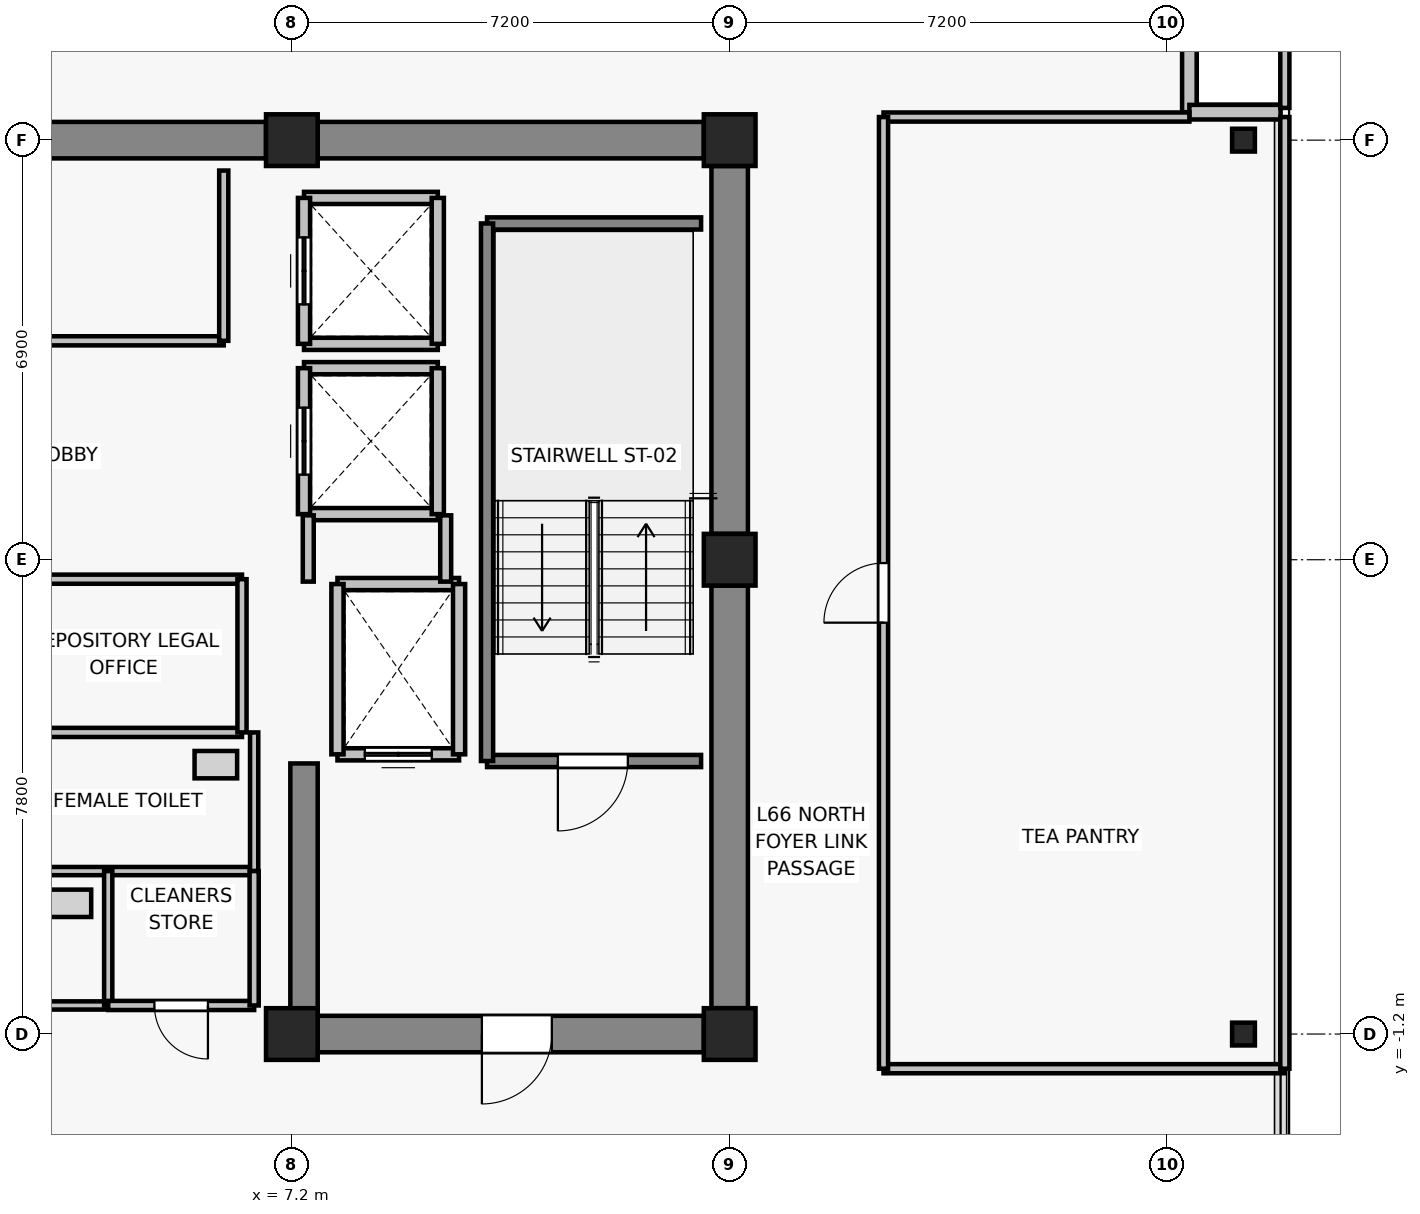
"""IFC4 building model, lengths in metres.
Left out: names, types, materials, properties, quantities, classifications, styles, units other than length and angle.
Written with IfcOpenShell. Run it as: python <this file> out.ifc"""

import sys

from ifc_helpers import new_model, si_unit, direction, frame, frame_2d, origin, origin_2d, place, context, subcontext, project, spatial, rectangle, i_section, extrude, source, transform, mapped, element, fill, save


model = new_model("IFC4")
c1 = context("Model", 3, precision=1e-05, world=origin(), true_north=direction((0.0, 1.0)))
c2 = subcontext(c1, "Body", "Model", "MODEL_VIEW")
j1 = project(units=[si_unit("LENGTHUNIT", "METRE"), si_unit("PLANEANGLEUNIT", "RADIAN")], contexts=[c1])
p1 = place(None, origin())
s1 = spatial("IfcSite", under=j1, at=p1, CompositionType="ELEMENT")
p2 = place(p1, origin())
s2 = spatial("IfcBuilding", under=s1, at=p2, CompositionType="ELEMENT")
p3 = place(p2, frame((0.0, 0.0, 235.3)))
s3 = spatial("IfcBuildingStorey", under=s2, at=p3, CompositionType="ELEMENT", Elevation=235.3)
for number, where, z_axis, x_axis in (
    (1, (7.2, -1.2, 0.0), (0.0, 0.0, 1.0), (1.0, 0.0, 0.0)),
    (2, (14.4, -1.2, 0.0), (0.0, 0.0, 1.0), (1.0, 0.0, 0.0)),
    (3, (14.4, 6.6, 0.0), (0.0, 0.0, 1.0), (1.0, 0.0, 0.0)),
    (4, (7.2, 13.5, 0.0), (0.0, 0.0, 1.0), (1.0, 0.0, 0.0)),
    (5, (14.4, 13.5, 0.0), (0.0, 0.0, 1.0), (1.0, 0.0, 0.0)),
):
    element("IfcColumn", number, at=place(p3, frame(where, z_axis=z_axis, x_axis=x_axis)), inside=s3, PredefinedType="COLUMN", context=c2, shape_type="SweptSolid", body=[
        extrude(rectangle(XDim=0.85, YDim=0.85, at=origin_2d()), origin(), (0.0, 0.0, 1.0), 3.3),
    ])
for number, where, z_axis, x_axis in (
    (6, (22.85, -1.2, 0.0), (0.0, 0.0, 1.0), (1.0, 0.0, 0.0)),
    (7, (22.85, 13.5, 0.0), (0.0, 0.0, 1.0), (1.0, 0.0, 0.0)),
):
    element("IfcColumn", number, at=place(p3, frame(where, z_axis=z_axis, x_axis=x_axis)), inside=s3, PredefinedType="COLUMN", context=c2, shape_type="SweptSolid", body=[
        extrude(i_section(OverallWidth=0.375, OverallDepth=0.375, WebThickness=0.017, FlangeThickness=0.027, FilletRadius=0.015, at=origin_2d()), origin(), (0.0, 0.0, 1.0), 3.3),
    ])
p4 = place(p3, frame((-6.775, 13.5, 0.0), z_axis=(0.0, 0.0, 1.0), x_axis=(1.0, 0.0, 0.0)))
e8 = element("IfcWall", 8, at=p4, inside=s3, PredefinedType="SHEAR", context=c2, shape_type="SweptSolid", body=[
    extrude(rectangle(XDim=13.55, YDim=0.6, at=frame_2d((6.775, 0.0))), origin(), (0.0, 0.0, 1.0), 3.075),
])
p5 = place(p3, frame((7.625, 13.5, 0.0), z_axis=(0.0, 0.0, 1.0), x_axis=(1.0, 0.0, 0.0)))
e9 = element("IfcWall", 9, at=p5, inside=s3, PredefinedType="SHEAR", context=c2, shape_type="SweptSolid", body=[
    extrude(rectangle(XDim=6.35, YDim=0.6, at=frame_2d((3.175, 0.0))), origin(), (0.0, 0.0, 1.0), 3.075),
])
p6 = place(p3, frame((14.4, -0.775, 0.0), z_axis=(0.0, 0.0, 1.0), x_axis=(0.0, 1.0, 0.0)))
e10 = element("IfcWall", 10, at=p6, inside=s3, PredefinedType="SHEAR", context=c2, shape_type="SweptSolid", body=[
    extrude(rectangle(XDim=6.95, YDim=0.6, at=frame_2d((3.475, 0.0))), origin(), (0.0, 0.0, 1.0), 3.075),
])
p7 = place(p3, frame((14.4, 7.025, 0.0), z_axis=(0.0, 0.0, 1.0), x_axis=(0.0, 1.0, 0.0)))
e11 = element("IfcWall", 11, at=p7, inside=s3, PredefinedType="SHEAR", context=c2, shape_type="SweptSolid", body=[
    extrude(rectangle(XDim=6.05, YDim=0.6, at=frame_2d((3.025, 0.0))), origin(), (0.0, 0.0, 1.0), 3.075),
])
p8 = place(p3, frame((13.975, -1.2, 0.0), z_axis=(0.0, 0.0, 1.0), x_axis=(-1.0, 0.0, 0.0)))
e12 = element("IfcWall", 12, at=p8, inside=s3, PredefinedType="SHEAR", context=c2, shape_type="SweptSolid", body=[
    extrude(rectangle(XDim=6.35, YDim=0.6, at=frame_2d((3.175, 0.0))), origin(), (0.0, 0.0, 1.0), 3.075),
])
p9 = place(p8, frame((2.5, 0.0, 0.0)))
e13 = element("IfcOpeningElement", 13, at=p9, cuts=e12, PredefinedType="OPENING", context=c2, shape_type="SweptSolid", body=[
    extrude(rectangle(XDim=1.15, YDim=2.15, at=frame_2d((0.575, 1.075))), frame((0.0, 0.31, 0.0), z_axis=(0.0, -1.0, 0.0), x_axis=(1.0, 0.0, 0.0)), (0.0, 0.0, 1.0), 0.62),
])
p10 = place(p3, frame((7.4, -0.9, 0.0), z_axis=(0.0, 0.0, 1.0), x_axis=(0.0, 1.0, 0.0)))
e14 = element("IfcWall", 14, at=p10, inside=s3, PredefinedType="SHEAR", context=c2, shape_type="SweptSolid", body=[
    extrude(rectangle(XDim=4.15, YDim=0.45, at=frame_2d((2.075, 0.0))), origin(), (0.0, 0.0, 1.0), 3.075),
])
for number, where, z_axis, x_axis in (
    (15, (21.96, 13.96, 0.0), (0.0, 0.0, 1.0), (0.0, 1.0, 0.0)),
    (16, (23.46, 13.96, 0.0), (0.0, 0.0, 1.0), (-1.0, 0.0, 0.0)),
):
    element("IfcWall", number, at=place(p3, frame(where, z_axis=z_axis, x_axis=x_axis)), inside=s3, PredefinedType="SOLIDWALL", context=c2, shape_type="SweptSolid", body=[
        extrude(rectangle(XDim=1.5, YDim=0.24, at=frame_2d((0.75, 0.0))), origin(), (0.0, 0.0, 1.0), 3.075),
    ])
p11 = place(p3, frame((9.95, 3.4, 0.0), z_axis=(0.0, 0.0, 1.0), x_axis=(-1.0, 0.0, 0.0)))
e17 = element("IfcWall", 17, at=p11, inside=s3, PredefinedType="SOLIDWALL", context=c2, shape_type="SweptSolid", body=[
    extrude(rectangle(XDim=2.0, YDim=0.2, at=frame_2d((1.0, 0.0))), origin(), (0.0, 0.0, 1.0), 3.075),
])
p12 = place(p11, frame((0.45, 0.0, 0.0)))
e18 = element("IfcOpeningElement", 18, at=p12, cuts=e17, PredefinedType="OPENING", context=c2, shape_type="SweptSolid", body=[
    extrude(rectangle(XDim=1.1, YDim=2.2, at=frame_2d((0.55, 1.1))), frame((0.0, 0.11, 0.0), z_axis=(0.0, -1.0, 0.0), x_axis=(1.0, 0.0, 0.0)), (0.0, 0.0, 1.0), 0.22),
])
p13 = place(p3, frame((7.95, 6.2, 0.0), z_axis=(0.0, 0.0, 1.0), x_axis=(1.0, 0.0, 0.0)))
e19 = element("IfcWall", 19, at=p13, inside=s3, PredefinedType="SOLIDWALL", context=c2, shape_type="SweptSolid", body=[
    extrude(rectangle(XDim=2.0, YDim=0.2, at=frame_2d((1.0, 0.0))), origin(), (0.0, 0.0, 1.0), 3.075),
])
for number, where, z_axis, x_axis in (
    (20, (7.95, 3.4, 0.0), (0.0, 0.0, 1.0), (0.0, 1.0, 0.0)),
    (21, (9.95, 6.2, 0.0), (0.0, 0.0, 1.0), (0.0, -1.0, 0.0)),
):
    element("IfcWall", number, at=place(p3, frame(where, z_axis=z_axis, x_axis=x_axis)), inside=s3, PredefinedType="SOLIDWALL", context=c2, shape_type="SweptSolid", body=[
        extrude(rectangle(XDim=2.8, YDim=0.2, at=frame_2d((1.4, 0.0))), origin(), (0.0, 0.0, 1.0), 3.075),
    ])
for number, where, z_axis, x_axis in (
    (22, (9.6, 7.35, 0.0), (0.0, 0.0, 1.0), (-1.0, 0.0, 0.0)),
    (23, (7.4, 9.75, 0.0), (0.0, 0.0, 1.0), (1.0, 0.0, 0.0)),
):
    element("IfcWall", number, at=place(p3, frame(where, z_axis=z_axis, x_axis=x_axis)), inside=s3, PredefinedType="SOLIDWALL", context=c2, shape_type="SweptSolid", body=[
        extrude(rectangle(XDim=2.2, YDim=0.2, at=frame_2d((1.1, 0.0))), origin(), (0.0, 0.0, 1.0), 2.615),
    ])
p14 = place(p3, frame((7.4, 7.35, 0.0), z_axis=(0.0, 0.0, 1.0), x_axis=(0.0, 1.0, 0.0)))
e24 = element("IfcWall", 24, at=p14, inside=s3, PredefinedType="SOLIDWALL", context=c2, shape_type="SweptSolid", body=[
    extrude(rectangle(XDim=2.4, YDim=0.2, at=frame_2d((1.2, 0.0))), origin(), (0.0, 0.0, 1.0), 2.615),
])
p15 = place(p14, frame((0.65, 0.0, 0.0)))
e25 = element("IfcOpeningElement", 25, at=p15, cuts=e24, PredefinedType="OPENING", context=c2, shape_type="SweptSolid", body=[
    extrude(rectangle(XDim=1.1, YDim=2.2, at=frame_2d((0.55, 1.1))), frame((0.0, 0.11, 0.0), z_axis=(0.0, -1.0, 0.0), x_axis=(1.0, 0.0, 0.0)), (0.0, 0.0, 1.0), 0.22),
])
p16 = place(p3, frame((9.6, 9.75, 0.0), z_axis=(0.0, 0.0, 1.0), x_axis=(0.0, -1.0, 0.0)))
e26 = element("IfcWall", 26, at=p16, inside=s3, PredefinedType="SOLIDWALL", context=c2, shape_type="SweptSolid", body=[
    extrude(rectangle(XDim=2.4, YDim=0.2, at=frame_2d((1.2, 0.0))), origin(), (0.0, 0.0, 1.0), 3.075),
])
for number, where, z_axis, x_axis in (
    (27, (9.6, 10.15, 0.0), (0.0, 0.0, 1.0), (-1.0, 0.0, 0.0)),
    (28, (7.4, 12.55, 0.0), (0.0, 0.0, 1.0), (1.0, 0.0, 0.0)),
):
    element("IfcWall", number, at=place(p3, frame(where, z_axis=z_axis, x_axis=x_axis)), inside=s3, PredefinedType="SOLIDWALL", context=c2, shape_type="SweptSolid", body=[
        extrude(rectangle(XDim=2.2, YDim=0.2, at=frame_2d((1.1, 0.0))), origin(), (0.0, 0.0, 1.0), 2.615),
    ])
p17 = place(p3, frame((7.4, 10.15, 0.0), z_axis=(0.0, 0.0, 1.0), x_axis=(0.0, 1.0, 0.0)))
e29 = element("IfcWall", 29, at=p17, inside=s3, PredefinedType="SOLIDWALL", context=c2, shape_type="SweptSolid", body=[
    extrude(rectangle(XDim=2.4, YDim=0.2, at=frame_2d((1.2, 0.0))), origin(), (0.0, 0.0, 1.0), 2.615),
])
p18 = place(p17, frame((0.65, 0.0, 0.0)))
e30 = element("IfcOpeningElement", 30, at=p18, cuts=e29, PredefinedType="OPENING", context=c2, shape_type="SweptSolid", body=[
    extrude(rectangle(XDim=1.1, YDim=2.2, at=frame_2d((0.55, 1.1))), frame((0.0, 0.11, 0.0), z_axis=(0.0, -1.0, 0.0), x_axis=(1.0, 0.0, 0.0)), (0.0, 0.0, 1.0), 0.22),
])
p19 = place(p3, frame((9.6, 12.55, 0.0), z_axis=(0.0, 0.0, 1.0), x_axis=(0.0, -1.0, 0.0)))
e31 = element("IfcWall", 31, at=p19, inside=s3, PredefinedType="SOLIDWALL", context=c2, shape_type="SweptSolid", body=[
    extrude(rectangle(XDim=2.4, YDim=0.2, at=frame_2d((1.2, 0.0))), origin(), (0.0, 0.0, 1.0), 3.075),
])
p20 = place(p3, frame((13.93, 3.29, 0.0), z_axis=(0.0, 0.0, 1.0), x_axis=(-1.0, 0.0, 0.0)))
e32 = element("IfcWall", 32, at=p20, inside=s3, PredefinedType="SOLIDWALL", context=c2, shape_type="SweptSolid", body=[
    extrude(rectangle(XDim=3.52, YDim=0.2, at=frame_2d((1.76, 0.0))), origin(), (0.0, 0.0, 1.0), 3.075),
])
p21 = place(p20, frame((1.205, 0.0, 0.0)))
e33 = element("IfcOpeningElement", 33, at=p21, cuts=e32, PredefinedType="OPENING", context=c2, shape_type="SweptSolid", body=[
    extrude(rectangle(XDim=1.15, YDim=2.15, at=frame_2d((0.575, 1.075))), frame((0.0, 0.11, 0.0), z_axis=(0.0, -1.0, 0.0), x_axis=(1.0, 0.0, 0.0)), (0.0, 0.0, 1.0), 0.22),
])
p22 = place(p3, frame((10.41, 12.13, 0.0), z_axis=(0.0, 0.0, 1.0), x_axis=(1.0, 0.0, 0.0)))
e34 = element("IfcWall", 34, at=p22, inside=s3, PredefinedType="SOLIDWALL", context=c2, shape_type="SweptSolid", body=[
    extrude(rectangle(XDim=3.52, YDim=0.2, at=frame_2d((1.76, 0.0))), origin(), (0.0, 0.0, 1.0), 3.075),
])
p23 = place(p3, frame((10.41, 3.29, 0.0), z_axis=(0.0, 0.0, 1.0), x_axis=(0.0, 1.0, 0.0)))
e35 = element("IfcWall", 35, at=p23, inside=s3, PredefinedType="SOLIDWALL", context=c2, shape_type="SweptSolid", body=[
    extrude(rectangle(XDim=8.84, YDim=0.2, at=frame_2d((4.42, 0.0))), origin(), (0.0, 0.0, 1.0), 3.075),
])
p24 = place(p3, frame((7.47, 6.24, 0.0), z_axis=(0.0, 0.0, 1.0), x_axis=(0.0, 1.0, 0.0)))
e36 = element("IfcWall", 36, at=p24, inside=s3, PredefinedType="PARTITIONING", context=c2, shape_type="SweptSolid", body=[
    extrude(rectangle(XDim=1.09, YDim=0.18, at=frame_2d((0.545, 0.0))), origin(), (0.0, 0.0, 1.0), 2.615),
])
p25 = place(p3, frame((9.73, 7.33, 0.0), z_axis=(0.0, 0.0, 1.0), x_axis=(0.0, -1.0, 0.0)))
e37 = element("IfcWall", 37, at=p25, inside=s3, PredefinedType="PARTITIONING", context=c2, shape_type="SweptSolid", body=[
    extrude(rectangle(XDim=1.09, YDim=0.18, at=frame_2d((0.545, 0.0))), origin(), (0.0, 0.0, 1.0), 3.075),
])
p26 = place(p3, frame((6.08, 10.2, 0.0), z_axis=(0.0, 0.0, 1.0), x_axis=(-1.0, 0.0, 0.0)))
e38 = element("IfcWall", 38, at=p26, inside=s3, PredefinedType="PARTITIONING", context=c2, shape_type="SweptSolid", body=[
    extrude(rectangle(XDim=12.16, YDim=0.15, at=frame_2d((6.08, 0.0))), origin(), (0.0, 0.0, 1.0), 3.075),
])
p27 = place(p26, frame((7.005, 0.0, 0.0)))
e39 = element("IfcOpeningElement", 39, at=p27, cuts=e38, PredefinedType="OPENING", context=c2, shape_type="SweptSolid", body=[
    extrude(rectangle(XDim=1.15, YDim=2.15, at=frame_2d((0.575, 1.075))), frame((0.0, 0.085, 0.0), z_axis=(0.0, -1.0, 0.0), x_axis=(1.0, 0.0, 0.0)), (0.0, 0.0, 1.0), 0.17),
])
p28 = place(p3, frame((6.08, 13.0, 0.0), z_axis=(0.0, 0.0, 1.0), x_axis=(0.0, -1.0, 0.0)))
e40 = element("IfcWall", 40, at=p28, inside=s3, PredefinedType="PARTITIONING", context=c2, shape_type="SweptSolid", body=[
    extrude(rectangle(XDim=2.8, YDim=0.15, at=frame_2d((1.4, 0.0))), origin(), (0.0, 0.0, 1.0), 3.075),
])
for number, where, z_axis, x_axis in (
    (41, (6.38, 3.76, 0.0), (0.0, 0.0, 1.0), (-1.0, 0.0, 0.0)),
    (42, (1.47, 6.28, 0.0), (0.0, 0.0, 1.0), (1.0, 0.0, 0.0)),
):
    element("IfcWall", number, at=place(p3, frame(where, z_axis=z_axis, x_axis=x_axis)), inside=s3, PredefinedType="PARTITIONING", context=c2, shape_type="SweptSolid", body=[
        extrude(rectangle(XDim=4.91, YDim=0.15, at=frame_2d((2.455, 0.0))), origin(), (0.0, 0.0, 1.0), 3.075),
    ])
p29 = place(p3, frame((6.38, 6.28, 0.0), z_axis=(0.0, 0.0, 1.0), x_axis=(0.0, -1.0, 0.0)))
e43 = element("IfcWall", 43, at=p29, inside=s3, PredefinedType="PARTITIONING", context=c2, shape_type="SweptSolid", body=[
    extrude(rectangle(XDim=2.52, YDim=0.15, at=frame_2d((1.26, 0.0))), origin(), (0.0, 0.0, 1.0), 3.075),
])
p30 = place(p3, frame((6.58, 1.48, 0.0), z_axis=(0.0, 0.0, 1.0), x_axis=(-1.0, 0.0, 0.0)))
e44 = element("IfcWall", 44, at=p30, inside=s3, PredefinedType="PARTITIONING", context=c2, shape_type="SweptSolid", body=[
    extrude(rectangle(XDim=5.11, YDim=0.135, at=frame_2d((2.555, 0.0))), origin(), (0.0, 0.0, 1.0), 3.075),
])
p31 = place(p3, frame((6.58, 3.76, 0.0), z_axis=(0.0, 0.0, 1.0), x_axis=(0.0, -1.0, 0.0)))
e45 = element("IfcWall", 45, at=p31, inside=s3, PredefinedType="PARTITIONING", context=c2, shape_type="SweptSolid", body=[
    extrude(rectangle(XDim=2.28, YDim=0.135, at=frame_2d((1.14, 0.0))), origin(), (0.0, 0.0, 1.0), 3.075),
])
p32 = place(p3, frame((4.18, -0.73, 0.0), z_axis=(0.0, 0.0, 1.0), x_axis=(-1.0, 0.0, 0.0)))
e46 = element("IfcWall", 46, at=p32, inside=s3, PredefinedType="PARTITIONING", context=c2, shape_type="SweptSolid", body=[
    extrude(rectangle(XDim=2.71, YDim=0.135, at=frame_2d((1.355, 0.0))), origin(), (0.0, 0.0, 1.0), 3.075),
])
p33 = place(p3, frame((4.18, 1.48, 0.0), z_axis=(0.0, 0.0, 1.0), x_axis=(0.0, -1.0, 0.0)))
e47 = element("IfcWall", 47, at=p33, inside=s3, PredefinedType="PARTITIONING", context=c2, shape_type="SweptSolid", body=[
    extrude(rectangle(XDim=2.21, YDim=0.135, at=frame_2d((1.105, 0.0))), origin(), (0.0, 0.0, 1.0), 3.075),
])
p34 = place(p3, frame((6.58, -0.73, 0.0), z_axis=(0.0, 0.0, 1.0), x_axis=(-1.0, 0.0, 0.0)))
e48 = element("IfcWall", 48, at=p34, inside=s3, PredefinedType="PARTITIONING", context=c2, shape_type="SweptSolid", body=[
    extrude(rectangle(XDim=2.4, YDim=0.15, at=frame_2d((1.2, 0.0))), origin(), (0.0, 0.0, 1.0), 3.075),
])
p35 = place(p34, frame((0.76, 0.0, 0.0)))
e49 = element("IfcOpeningElement", 49, at=p35, cuts=e48, PredefinedType="OPENING", context=c2, shape_type="SweptSolid", body=[
    extrude(rectangle(XDim=0.88, YDim=2.1, at=frame_2d((0.44, 1.05))), frame((0.0, 0.085, 0.0), z_axis=(0.0, -1.0, 0.0), x_axis=(1.0, 0.0, 0.0)), (0.0, 0.0, 1.0), 0.17),
])
p36 = place(p3, frame((6.58, 1.48, 0.0), z_axis=(0.0, 0.0, 1.0), x_axis=(0.0, -1.0, 0.0)))
e50 = element("IfcWall", 50, at=p36, inside=s3, PredefinedType="PARTITIONING", context=c2, shape_type="SweptSolid", body=[
    extrude(rectangle(XDim=2.21, YDim=0.15, at=frame_2d((1.105, 0.0))), origin(), (0.0, 0.0, 1.0), 3.075),
])
p37 = place(p3, frame((23.53, -1.77, 0.0), z_axis=(0.0, 0.0, 1.0), x_axis=(-1.0, 0.0, 0.0)))
e51 = element("IfcWall", 51, at=p37, inside=s3, PredefinedType="PARTITIONING", context=c2, shape_type="SweptSolid", body=[
    extrude(rectangle(XDim=6.6, YDim=0.15, at=frame_2d((3.3, 0.0))), origin(), (0.0, 0.0, 1.0), 2.765),
])
p38 = place(p3, frame((16.93, 13.88, 0.0), z_axis=(0.0, 0.0, 1.0), x_axis=(1.0, 0.0, 0.0)))
e52 = element("IfcWall", 52, at=p38, inside=s3, PredefinedType="PARTITIONING", context=c2, shape_type="SweptSolid", body=[
    extrude(rectangle(XDim=5.03, YDim=0.15, at=frame_2d((2.515, 0.0))), origin(), (0.0, 0.0, 1.0), 3.075),
])
p39 = place(p3, frame((16.93, -1.77, 0.0), z_axis=(0.0, 0.0, 1.0), x_axis=(0.0, 1.0, 0.0)))
e53 = element("IfcWall", 53, at=p39, inside=s3, PredefinedType="PARTITIONING", context=c2, shape_type="SweptSolid", body=[
    extrude(rectangle(XDim=15.65, YDim=0.15, at=frame_2d((7.825, 0.0))), origin(), (0.0, 0.0, 1.0), 2.615),
])
p40 = place(p39, frame((7.335, 0.0, 0.0)))
e54 = element("IfcOpeningElement", 54, at=p40, cuts=e53, PredefinedType="OPENING", context=c2, shape_type="SweptSolid", body=[
    extrude(rectangle(XDim=0.98, YDim=2.15, at=frame_2d((0.49, 1.075))), frame((0.0, 0.085, 0.0), z_axis=(0.0, -1.0, 0.0), x_axis=(1.0, 0.0, 0.0)), (0.0, 0.0, 1.0), 0.17),
])
p41 = place(p3, frame((23.53, 13.88, 0.0), z_axis=(0.0, 0.0, 1.0), x_axis=(0.0, -1.0, 0.0)))
e55 = element("IfcWall", 55, at=p41, inside=s3, PredefinedType="PARTITIONING", context=c2, shape_type="SweptSolid", body=[
    extrude(rectangle(XDim=15.65, YDim=0.15, at=frame_2d((7.825, 0.0))), origin(), (0.0, 0.0, 1.0), 3.075),
])
p42 = place(p3, frame((23.53, 17.03, 0.0), z_axis=(0.0, 0.0, 1.0), x_axis=(0.0, -1.0, 0.0)))
e56 = element("IfcWall", 56, at=p42, inside=s3, PredefinedType="PARTITIONING", context=c2, shape_type="SweptSolid", body=[
    extrude(rectangle(XDim=3.0, YDim=0.15, at=frame_2d((1.5, 0.0))), origin(), (0.0, 0.0, 1.0), 3.075),
])
m1 = source(origin(), c2, "Body", "SweptSolid", [
    extrude(rectangle(XDim=1.1, YDim=2.2, at=frame_2d((0.55, 1.1))), frame((0.0, 0.025, 0.0), z_axis=(0.0, -1.0, 0.0), x_axis=(1.0, 0.0, 0.0)), (0.0, 0.0, 1.0), 0.05),
])
p43 = place(p12, origin())
e57 = element("IfcDoor", 57, at=p43, inside=s3, OperationType="DOUBLE_DOOR_SLIDING", PredefinedType="DOOR", context=c2, shape_type="MappedRepresentation", body=[
    mapped(m1, transform((0.0, 0.0, 0.0), x_axis=(1.0, 0.0, 0.0), y_axis=(0.0, 1.0, 0.0), z_axis=(0.0, 0.0, 1.0), scale=1.0)),
])
fill(e18, e57)
p44 = place(p15, origin())
e58 = element("IfcDoor", 58, at=p44, inside=s3, OperationType="DOUBLE_DOOR_SLIDING", PredefinedType="DOOR", context=c2, shape_type="MappedRepresentation", body=[
    mapped(m1, transform((0.0, 0.0, 0.0), x_axis=(1.0, 0.0, 0.0), y_axis=(0.0, 1.0, 0.0), z_axis=(0.0, 0.0, 1.0), scale=1.0)),
])
fill(e25, e58)
p45 = place(p18, origin())
e59 = element("IfcDoor", 59, at=p45, inside=s3, OperationType="DOUBLE_DOOR_SLIDING", PredefinedType="DOOR", context=c2, shape_type="MappedRepresentation", body=[
    mapped(m1, transform((0.0, 0.0, 0.0), x_axis=(1.0, 0.0, 0.0), y_axis=(0.0, 1.0, 0.0), z_axis=(0.0, 0.0, 1.0), scale=1.0)),
])
fill(e30, e59)
m2 = source(origin(), c2, "Body", "SweptSolid", [
    extrude(rectangle(XDim=1.15, YDim=2.15, at=frame_2d((0.575, 1.075))), frame((0.0, 0.025, 0.0), z_axis=(0.0, -1.0, 0.0), x_axis=(1.0, 0.0, 0.0)), (0.0, 0.0, 1.0), 0.05),
])
p46 = place(p21, origin())
e60 = element("IfcDoor", 60, at=p46, inside=s3, OperationType="SINGLE_SWING_RIGHT", PredefinedType="DOOR", context=c2, shape_type="MappedRepresentation", body=[
    mapped(m2, transform((0.0, 0.0, 0.0), x_axis=(1.0, 0.0, 0.0), y_axis=(0.0, 1.0, 0.0), z_axis=(0.0, 0.0, 1.0), scale=1.0)),
])
fill(e33, e60)
p47 = place(p9, origin())
e61 = element("IfcDoor", 61, at=p47, inside=s3, OperationType="SINGLE_SWING_RIGHT", PredefinedType="DOOR", context=c2, shape_type="MappedRepresentation", body=[
    mapped(m2, transform((0.0, 0.0, 0.0), x_axis=(1.0, 0.0, 0.0), y_axis=(0.0, 1.0, 0.0), z_axis=(0.0, 0.0, 1.0), scale=1.0)),
])
fill(e13, e61)
m3 = source(origin(), c2, "Body", "SweptSolid", [
    extrude(rectangle(XDim=0.88, YDim=2.1, at=frame_2d((0.44, 1.05))), frame((0.0, 0.025, 0.0), z_axis=(0.0, -1.0, 0.0), x_axis=(1.0, 0.0, 0.0)), (0.0, 0.0, 1.0), 0.05),
])
p48 = place(p35, origin())
e62 = element("IfcDoor", 62, at=p48, inside=s3, OperationType="SINGLE_SWING_LEFT", PredefinedType="DOOR", context=c2, shape_type="MappedRepresentation", body=[
    mapped(m3, transform((0.0, 0.0, 0.0), x_axis=(1.0, 0.0, 0.0), y_axis=(0.0, 1.0, 0.0), z_axis=(0.0, 0.0, 1.0), scale=1.0)),
])
fill(e49, e62)
m4 = source(origin(), c2, "Body", "SweptSolid", [
    extrude(rectangle(XDim=0.98, YDim=2.15, at=frame_2d((0.49, 1.075))), frame((0.0, 0.025, 0.0), z_axis=(0.0, -1.0, 0.0), x_axis=(1.0, 0.0, 0.0)), (0.0, 0.0, 1.0), 0.05),
])
p49 = place(p40, origin())
e63 = element("IfcDoor", 63, at=p49, inside=s3, OperationType="SINGLE_SWING_LEFT", PredefinedType="DOOR", context=c2, shape_type="MappedRepresentation", body=[
    mapped(m4, transform((0.0, 0.0, 0.0), x_axis=(1.0, 0.0, 0.0), y_axis=(0.0, 1.0, 0.0), z_axis=(0.0, 0.0, 1.0), scale=1.0)),
])
fill(e54, e63)
save(model, sys.argv[1])
